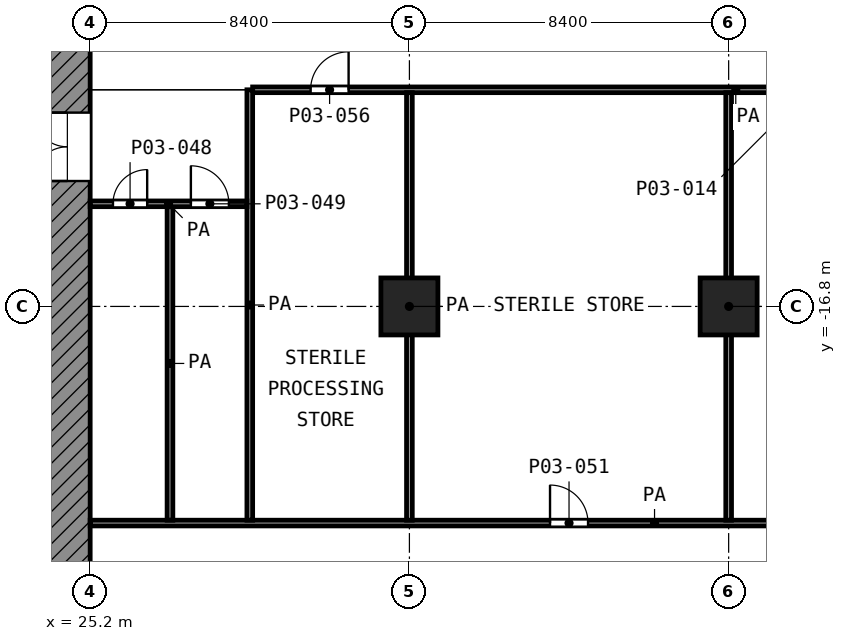
"""IFC4 building model, lengths in metres.
Left out: names, types, materials, properties, quantities, classifications, styles, units other than length and angle.
Written with IfcOpenShell. Run it as: python <this file> out.ifc"""

import sys

from ifc_helpers import new_model, si_unit, direction, frame, frame_2d, origin, origin_2d, place, context, subcontext, project, spatial, rectangle, extrude, element, fill, save


model = new_model("IFC4")
c1 = context("Model", 3, precision=1e-05, world=origin(), true_north=direction((0.0, 1.0)))
c2 = subcontext(c1, "Body", "Model", "MODEL_VIEW")
j1 = project(units=[si_unit("LENGTHUNIT", "METRE"), si_unit("PLANEANGLEUNIT", "RADIAN")], contexts=[c1])
p1 = place(None, origin())
s1 = spatial("IfcSite", under=j1, at=p1, CompositionType="ELEMENT")
p2 = place(p1, origin())
s2 = spatial("IfcBuilding", under=s1, at=p2, CompositionType="ELEMENT")
p3 = place(p2, frame((0.0, 0.0, 12.6)))
s3 = spatial("IfcBuildingStorey", under=s2, at=p3, CompositionType="ELEMENT", Elevation=12.6)
for number, where, z_axis, x_axis in (
    (1, (33.6, -16.8, 0.0), (0.0, 0.0, 1.0), (1.0, 0.0, 0.0)),
    (2, (42.0, -16.8, 0.0), (0.0, 0.0, 1.0), (1.0, 0.0, 0.0)),
):
    element("IfcColumn", number, at=place(p3, frame(where, z_axis=z_axis, x_axis=x_axis)), inside=s3, PredefinedType="COLUMN", context=c2, shape_type="SweptSolid", body=[
        extrude(rectangle(XDim=1.5, YDim=1.5, at=origin_2d()), origin(), (0.0, 0.0, 1.0), 5.6),
    ])
p4 = place(p3, frame((24.6, -24.0, 0.0), z_axis=(0.0, 0.0, 1.0), x_axis=(0.0, 1.0, 0.0)))
e3 = element("IfcWall", 3, at=p4, inside=s3, PredefinedType="SHEAR", context=c2, shape_type="SweptSolid", body=[
    extrude(rectangle(XDim=18.6, YDim=1.2, at=frame_2d((9.3, 0.0))), origin(), (0.0, 0.0, 1.0), 5.25),
])
p5 = place(p4, frame((10.5, 0.0, 0.0)))
e4 = element("IfcOpeningElement", 4, at=p5, cuts=e3, PredefinedType="OPENING", context=c2, shape_type="SweptSolid", body=[
    extrude(rectangle(XDim=1.8, YDim=2.1, at=frame_2d((0.9, 1.05))), frame((0.0, 0.61, 0.0), z_axis=(0.0, -1.0, 0.0), x_axis=(1.0, 0.0, 0.0)), (0.0, 0.0, 1.0), 1.22),
])
p6 = place(p3, frame((25.2, -22.5, 0.0), z_axis=(0.0, 0.0, 1.0), x_axis=(1.0, 0.0, 0.0)))
e5 = element("IfcWall", 5, at=p6, inside=s3, PredefinedType="PARTITIONING", context=c2, shape_type="SweptSolid", body=[
    extrude(rectangle(XDim=29.7, YDim=0.15, at=frame_2d((14.85, 0.0))), origin(), (0.0, 0.0, 1.0), 5.25),
])
p7 = place(p6, frame((12.1, 0.0, 0.0)))
e6 = element("IfcOpeningElement", 6, at=p7, cuts=e5, PredefinedType="OPENING", context=c2, shape_type="SweptSolid", body=[
    extrude(rectangle(XDim=1.0, YDim=2.1, at=frame_2d((0.5, 1.05))), frame((0.0, 0.085, 0.0), z_axis=(0.0, -1.0, 0.0), x_axis=(1.0, 0.0, 0.0)), (0.0, 0.0, 1.0), 0.17),
])
p8 = place(p6, frame((26.7, 0.0, 0.0)))
e7 = element("IfcOpeningElement", 7, at=p8, cuts=e5, PredefinedType="OPENING", context=c2, shape_type="SweptSolid", body=[
    extrude(rectangle(XDim=1.5, YDim=2.1, at=frame_2d((0.75, 1.05))), frame((0.0, 0.085, 0.0), z_axis=(0.0, -1.0, 0.0), x_axis=(1.0, 0.0, 0.0)), (0.0, 0.0, 1.0), 0.17),
])
p9 = place(p3, frame((25.2, -14.1, 0.0), z_axis=(0.0, 0.0, 1.0), x_axis=(1.0, 0.0, 0.0)))
e8 = element("IfcWall", 8, at=p9, inside=s3, PredefinedType="PARTITIONING", context=c2, shape_type="SweptSolid", body=[
    extrude(rectangle(XDim=4.125, YDim=0.15, at=frame_2d((2.062, 0.0))), origin(), (0.0, 0.0, 1.0), 5.25),
])
p10 = place(p9, frame((0.6, 0.0, 0.0)))
e9 = element("IfcOpeningElement", 9, at=p10, cuts=e8, PredefinedType="OPENING", context=c2, shape_type="SweptSolid", body=[
    extrude(rectangle(XDim=0.9, YDim=2.1, at=frame_2d((0.45, 1.05))), frame((0.0, 0.085, 0.0), z_axis=(0.0, -1.0, 0.0), x_axis=(1.0, 0.0, 0.0)), (0.0, 0.0, 1.0), 0.17),
])
p11 = place(p9, frame((2.65, 0.0, 0.0)))
e10 = element("IfcOpeningElement", 10, at=p11, cuts=e8, PredefinedType="OPENING", context=c2, shape_type="SweptSolid", body=[
    extrude(rectangle(XDim=1.0, YDim=2.1, at=frame_2d((0.5, 1.05))), frame((0.0, 0.085, 0.0), z_axis=(0.0, -1.0, 0.0), x_axis=(1.0, 0.0, 0.0)), (0.0, 0.0, 1.0), 0.17),
])
p12 = place(p3, frame((29.475, -11.1, 0.0), z_axis=(0.0, 0.0, 1.0), x_axis=(1.0, 0.0, 0.0)))
e11 = element("IfcWall", 11, at=p12, inside=s3, PredefinedType="PARTITIONING", context=c2, shape_type="SweptSolid", body=[
    extrude(rectangle(XDim=25.425, YDim=0.15, at=frame_2d((12.712, 0.0))), origin(), (0.0, 0.0, 1.0), 5.25),
])
p13 = place(p12, frame((18.075, 0.0, 0.0)))
e12 = element("IfcOpeningElement", 12, at=p13, cuts=e11, PredefinedType="OPENING", context=c2, shape_type="SweptSolid", body=[
    extrude(rectangle(XDim=1.5, YDim=2.1, at=frame_2d((0.75, 1.05))), frame((0.0, 0.085, 0.0), z_axis=(0.0, -1.0, 0.0), x_axis=(1.0, 0.0, 0.0)), (0.0, 0.0, 1.0), 0.17),
])
p14 = place(p12, frame((15.975, 0.0, 0.0)))
e13 = element("IfcOpeningElement", 13, at=p14, cuts=e11, PredefinedType="OPENING", context=c2, shape_type="SweptSolid", body=[
    extrude(rectangle(XDim=1.5, YDim=2.1, at=frame_2d((0.75, 1.05))), frame((0.0, 0.085, 0.0), z_axis=(0.0, -1.0, 0.0), x_axis=(1.0, 0.0, 0.0)), (0.0, 0.0, 1.0), 0.17),
])
p15 = place(p12, frame((13.875, 0.0, 0.0)))
e14 = element("IfcOpeningElement", 14, at=p15, cuts=e11, PredefinedType="OPENING", context=c2, shape_type="SweptSolid", body=[
    extrude(rectangle(XDim=1.5, YDim=2.1, at=frame_2d((0.75, 1.05))), frame((0.0, 0.085, 0.0), z_axis=(0.0, -1.0, 0.0), x_axis=(1.0, 0.0, 0.0)), (0.0, 0.0, 1.0), 0.17),
])
p16 = place(p12, frame((22.425, 0.0, 0.0)))
e15 = element("IfcOpeningElement", 15, at=p16, cuts=e11, PredefinedType="OPENING", context=c2, shape_type="SweptSolid", body=[
    extrude(rectangle(XDim=1.5, YDim=2.1, at=frame_2d((0.75, 1.05))), frame((0.0, 0.085, 0.0), z_axis=(0.0, -1.0, 0.0), x_axis=(1.0, 0.0, 0.0)), (0.0, 0.0, 1.0), 0.17),
])
p17 = place(p12, frame((1.525, 0.0, 0.0)))
e16 = element("IfcOpeningElement", 16, at=p17, cuts=e11, PredefinedType="OPENING", context=c2, shape_type="SweptSolid", body=[
    extrude(rectangle(XDim=1.0, YDim=2.1, at=frame_2d((0.5, 1.05))), frame((0.0, 0.085, 0.0), z_axis=(0.0, -1.0, 0.0), x_axis=(1.0, 0.0, 0.0)), (0.0, 0.0, 1.0), 0.17),
])
p18 = place(p3, frame((27.3, -22.425, 0.0), z_axis=(0.0, 0.0, 1.0), x_axis=(0.0, 1.0, 0.0)))
e17 = element("IfcWall", 17, at=p18, inside=s3, PredefinedType="PARTITIONING", context=c2, shape_type="SweptSolid", body=[
    extrude(rectangle(XDim=8.25, YDim=0.15, at=frame_2d((4.125, 0.0))), origin(), (0.0, 0.0, 1.0), 5.25),
])
p19 = place(p3, frame((29.4, -22.425, 0.0), z_axis=(0.0, 0.0, 1.0), x_axis=(0.0, 1.0, 0.0)))
e18 = element("IfcWall", 18, at=p19, inside=s3, PredefinedType="PARTITIONING", context=c2, shape_type="SweptSolid", body=[
    extrude(rectangle(XDim=11.325, YDim=0.15, at=frame_2d((5.663, 0.0))), origin(), (0.0, 0.0, 1.0), 5.25),
])
for number, where, z_axis, x_axis in (
    (19, (33.6, -22.425, 0.0), (0.0, 0.0, 1.0), (0.0, 1.0, 0.0)),
    (20, (42.0, -22.425, 0.0), (0.0, 0.0, 1.0), (0.0, 1.0, 0.0)),
):
    element("IfcWall", number, at=place(p3, frame(where, z_axis=z_axis, x_axis=x_axis)), inside=s3, PredefinedType="PARTITIONING", context=c2, shape_type="SweptSolid", body=[
        extrude(rectangle(XDim=11.25, YDim=0.15, at=frame_2d((5.625, 0.0))), origin(), (0.0, 0.0, 1.0), 5.25),
    ])
p20 = place(p5, origin())
e21 = element("IfcDoor", 21, at=p20, inside=s3, OperationType="DOUBLE_DOOR_SINGLE_SWING", PredefinedType="DOOR", context=c2, shape_type="SweptSolid", body=[
    extrude(rectangle(XDim=1.8, YDim=2.1, at=frame_2d((0.9, 1.05))), frame((0.0, 0.025, 0.0), z_axis=(0.0, -1.0, 0.0), x_axis=(1.0, 0.0, 0.0)), (0.0, 0.0, 1.0), 0.05),
])
fill(e4, e21)
p21 = place(p7, origin())
e22 = element("IfcDoor", 22, at=p21, inside=s3, OperationType="SINGLE_SWING_LEFT", PredefinedType="DOOR", context=c2, shape_type="SweptSolid", body=[
    extrude(rectangle(XDim=1.0, YDim=2.1, at=frame_2d((0.5, 1.05))), frame((0.0, 0.025, 0.0), z_axis=(0.0, -1.0, 0.0), x_axis=(1.0, 0.0, 0.0)), (0.0, 0.0, 1.0), 0.05),
])
fill(e6, e22)
p22 = place(p10, origin())
e23 = element("IfcDoor", 23, at=p22, inside=s3, OperationType="SINGLE_SWING_RIGHT", PredefinedType="DOOR", context=c2, shape_type="SweptSolid", body=[
    extrude(rectangle(XDim=0.9, YDim=2.1, at=frame_2d((0.45, 1.05))), frame((0.0, 0.025, 0.0), z_axis=(0.0, -1.0, 0.0), x_axis=(1.0, 0.0, 0.0)), (0.0, 0.0, 1.0), 0.05),
])
fill(e9, e23)
p23 = place(p11, origin())
e24 = element("IfcDoor", 24, at=p23, inside=s3, OperationType="SINGLE_SWING_LEFT", PredefinedType="DOOR", context=c2, shape_type="SweptSolid", body=[
    extrude(rectangle(XDim=1.0, YDim=2.1, at=frame_2d((0.5, 1.05))), frame((0.0, 0.025, 0.0), z_axis=(0.0, -1.0, 0.0), x_axis=(1.0, 0.0, 0.0)), (0.0, 0.0, 1.0), 0.05),
])
fill(e10, e24)
p24 = place(p17, origin())
e25 = element("IfcDoor", 25, at=p24, inside=s3, OperationType="SINGLE_SWING_RIGHT", PredefinedType="DOOR", context=c2, shape_type="SweptSolid", body=[
    extrude(rectangle(XDim=1.0, YDim=2.1, at=frame_2d((0.5, 1.05))), frame((0.0, 0.025, 0.0), z_axis=(0.0, -1.0, 0.0), x_axis=(1.0, 0.0, 0.0)), (0.0, 0.0, 1.0), 0.05),
])
fill(e16, e25)
save(model, sys.argv[1])
